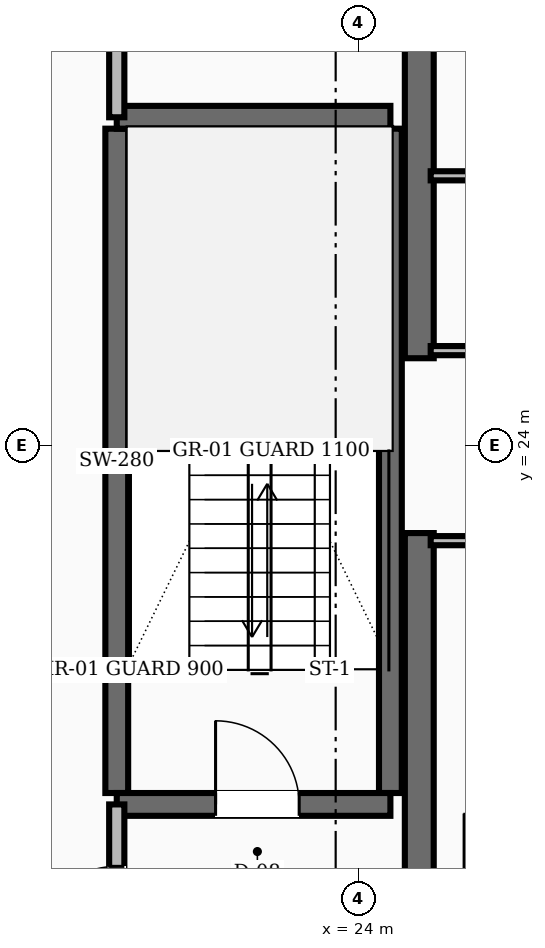
"""IFC4 building model, lengths in metres.
Left out: names, types, materials, properties, quantities, classifications, styles, units other than length and angle.
Written with IfcOpenShell. Run it as: python <this file> out.ifc"""

import sys

from ifc_helpers import new_model, si_unit, direction, frame, frame_2d, origin, place, context, subcontext, project, spatial, rectangle, extrude, element, fill, save


model = new_model("IFC4")
c1 = context("Model", 3, precision=1e-05, world=origin(), true_north=direction((0.0, 1.0)))
c2 = subcontext(c1, "Body", "Model", "MODEL_VIEW")
j1 = project(units=[si_unit("LENGTHUNIT", "METRE"), si_unit("PLANEANGLEUNIT", "RADIAN")], contexts=[c1])
p1 = place(None, origin())
s1 = spatial("IfcSite", under=j1, at=p1, CompositionType="ELEMENT")
p2 = place(p1, origin())
s2 = spatial("IfcBuilding", under=s1, at=p2, CompositionType="ELEMENT")
p3 = place(p2, frame((0.0, 0.0, 88.0)))
s3 = spatial("IfcBuildingStorey", under=s2, at=p3, CompositionType="ELEMENT", Elevation=88.0)
for number, where, z_axis, x_axis in (
    (1, (24.8, 16.55, 0.0), (0.0, 0.0, 1.0), (0.0, 1.0, 0.0)),
    (2, (24.8, 25.15, 0.0), (0.0, 0.0, 1.0), (0.0, 1.0, 0.0)),
):
    element("IfcWall", number, at=place(p3, frame(where, z_axis=z_axis, x_axis=x_axis)), inside=s3, PredefinedType="SHEAR", context=c2, shape_type="SweptSolid", body=[
        extrude(rectangle(XDim=6.3, YDim=0.38, at=frame_2d((3.15, 0.0))), origin(), (0.0, 0.0, 1.0), 3.6),
    ])
for number, where, z_axis, x_axis in (
    (3, (20.82, 19.43, 0.0), (0.0, 0.0, 1.0), (0.0, 1.0, 0.0)),
    (4, (24.42, 19.43, 0.0), (0.0, 0.0, 1.0), (0.0, 1.0, 0.0)),
):
    element("IfcWall", number, at=place(p3, frame(where, z_axis=z_axis, x_axis=x_axis)), inside=s3, PredefinedType="SHEAR", context=c2, shape_type="SweptSolid", body=[
        extrude(rectangle(XDim=8.74, YDim=0.3, at=frame_2d((4.37, 0.0))), origin(), (0.0, 0.0, 1.0), 3.6),
    ])
p4 = place(p3, frame((20.82, 19.28, 0.0), z_axis=(0.0, 0.0, 1.0), x_axis=(1.0, 0.0, 0.0)))
e5 = element("IfcWall", 5, at=p4, inside=s3, PredefinedType="SHEAR", context=c2, shape_type="SweptSolid", body=[
    extrude(rectangle(XDim=3.6, YDim=0.3, at=frame_2d((1.8, 0.0))), origin(), (0.0, 0.0, 1.0), 3.6),
])
p5 = place(p4, frame((1.3, 0.0, 0.0)))
e6 = element("IfcOpeningElement", 6, at=p5, cuts=e5, PredefinedType="OPENING", context=c2, shape_type="SweptSolid", body=[
    extrude(rectangle(XDim=1.1, YDim=2.1, at=frame_2d((0.55, 1.05))), frame((0.0, 0.16, 0.0), z_axis=(0.0, -1.0, 0.0), x_axis=(1.0, 0.0, 0.0)), (0.0, 0.0, 1.0), 0.32),
])
p6 = place(p3, frame((20.82, 28.32, 0.0), z_axis=(0.0, 0.0, 1.0), x_axis=(1.0, 0.0, 0.0)))
e7 = element("IfcWall", 7, at=p6, inside=s3, PredefinedType="SHEAR", context=c2, shape_type="SweptSolid", body=[
    extrude(rectangle(XDim=3.6, YDim=0.3, at=frame_2d((1.8, 0.0))), origin(), (0.0, 0.0, 1.0), 3.6),
])
p7 = place(p3, frame((20.82, 16.55, 0.0), z_axis=(0.0, 0.0, 1.0), x_axis=(0.0, 1.0, 0.0)))
e8 = element("IfcWall", 8, at=p7, inside=s3, PredefinedType="SOLIDWALL", context=c2, shape_type="SweptSolid", body=[
    extrude(rectangle(XDim=2.73, YDim=0.2, at=frame_2d((1.365, 0.0))), origin(), (0.0, 0.0, 1.0), 2.71),
])
p8 = place(p7, frame((0.815, 0.0, 0.0)))
e9 = element("IfcOpeningElement", 9, at=p8, cuts=e8, PredefinedType="OPENING", context=c2, shape_type="SweptSolid", body=[
    extrude(rectangle(XDim=1.1, YDim=2.1, at=frame_2d((0.55, 1.05))), frame((0.0, 0.11, 0.0), z_axis=(0.0, -1.0, 0.0), x_axis=(1.0, 0.0, 0.0)), (0.0, 0.0, 1.0), 0.22),
])
p9 = place(p3, frame((20.82, 28.32, 0.0), z_axis=(0.0, 0.0, 1.0), x_axis=(0.0, 1.0, 0.0)))
e10 = element("IfcWall", 10, at=p9, inside=s3, PredefinedType="SOLIDWALL", context=c2, shape_type="SweptSolid", body=[
    extrude(rectangle(XDim=3.13, YDim=0.2, at=frame_2d((1.565, 0.0))), origin(), (0.0, 0.0, 1.0), 2.71),
])
p10 = place(p9, frame((1.09, 0.0, 0.0)))
e11 = element("IfcOpeningElement", 11, at=p10, cuts=e10, PredefinedType="OPENING", context=c2, shape_type="SweptSolid", body=[
    extrude(rectangle(XDim=0.95, YDim=2.1, at=frame_2d((0.475, 1.05))), frame((0.0, 0.11, 0.0), z_axis=(0.0, -1.0, 0.0), x_axis=(1.0, 0.0, 0.0)), (0.0, 0.0, 1.0), 0.22),
])
p11 = place(p3, frame((24.95, 25.25, 0.0), z_axis=(0.0, 0.0, 1.0), x_axis=(1.0, 0.0, 0.0)))
e12 = element("IfcWall", 12, at=p11, inside=s3, PredefinedType="PARTITIONING", context=c2, shape_type="SweptSolid", body=[
    extrude(rectangle(XDim=3.2, YDim=0.12, at=frame_2d((1.6, 0.0))), origin(), (0.0, 0.0, 1.0), 2.71),
])
p12 = place(p11, frame((1.125, 0.0, 0.0)))
e13 = element("IfcOpeningElement", 13, at=p12, cuts=e12, PredefinedType="OPENING", context=c2, shape_type="SweptSolid", body=[
    extrude(rectangle(XDim=0.95, YDim=2.1, at=frame_2d((0.475, 1.05))), frame((0.0, 0.07, 0.0), z_axis=(0.0, -1.0, 0.0), x_axis=(1.0, 0.0, 0.0)), (0.0, 0.0, 1.0), 0.14),
])
p13 = place(p3, frame((24.95, 22.75, 0.0), z_axis=(0.0, 0.0, 1.0), x_axis=(1.0, 0.0, 0.0)))
e14 = element("IfcWall", 14, at=p13, inside=s3, PredefinedType="PARTITIONING", context=c2, shape_type="SweptSolid", body=[
    extrude(rectangle(XDim=3.2, YDim=0.12, at=frame_2d((1.6, 0.0))), origin(), (0.0, 0.0, 1.0), 2.71),
])
p14 = place(p13, frame((1.125, 0.0, 0.0)))
e15 = element("IfcOpeningElement", 15, at=p14, cuts=e14, PredefinedType="OPENING", context=c2, shape_type="SweptSolid", body=[
    extrude(rectangle(XDim=0.95, YDim=2.1, at=frame_2d((0.475, 1.05))), frame((0.0, 0.07, 0.0), z_axis=(0.0, -1.0, 0.0), x_axis=(1.0, 0.0, 0.0)), (0.0, 0.0, 1.0), 0.14),
])
p15 = place(p3, frame((24.95, 27.55, 0.0), z_axis=(0.0, 0.0, 1.0), x_axis=(1.0, 0.0, 0.0)))
e16 = element("IfcWall", 16, at=p15, inside=s3, PredefinedType="PARTITIONING", context=c2, shape_type="SweptSolid", body=[
    extrude(rectangle(XDim=3.2, YDim=0.12, at=frame_2d((1.6, 0.0))), origin(), (0.0, 0.0, 1.0), 2.71),
])
p16 = place(p15, frame((1.125, 0.0, 0.0)))
e17 = element("IfcOpeningElement", 17, at=p16, cuts=e16, PredefinedType="OPENING", context=c2, shape_type="SweptSolid", body=[
    extrude(rectangle(XDim=0.95, YDim=2.1, at=frame_2d((0.475, 1.05))), frame((0.0, 0.07, 0.0), z_axis=(0.0, -1.0, 0.0), x_axis=(1.0, 0.0, 0.0)), (0.0, 0.0, 1.0), 0.14),
])
p17 = place(p5, origin())
e18 = element("IfcDoor", 18, at=p17, inside=s3, OperationType="SINGLE_SWING_LEFT", PredefinedType="DOOR", context=c2, shape_type="SweptSolid", body=[
    extrude(rectangle(XDim=1.1, YDim=2.1, at=frame_2d((0.55, 1.05))), frame((0.0, 0.025, 0.0), z_axis=(0.0, -1.0, 0.0), x_axis=(1.0, 0.0, 0.0)), (0.0, 0.0, 1.0), 0.05),
])
fill(e6, e18)
p18 = place(p8, origin())
e19 = element("IfcDoor", 19, at=p18, inside=s3, OperationType="SINGLE_SWING_LEFT", PredefinedType="DOOR", context=c2, shape_type="SweptSolid", body=[
    extrude(rectangle(XDim=1.1, YDim=2.1, at=frame_2d((0.55, 1.05))), frame((0.0, 0.025, 0.0), z_axis=(0.0, -1.0, 0.0), x_axis=(1.0, 0.0, 0.0)), (0.0, 0.0, 1.0), 0.05),
])
fill(e9, e19)
save(model, sys.argv[1])
